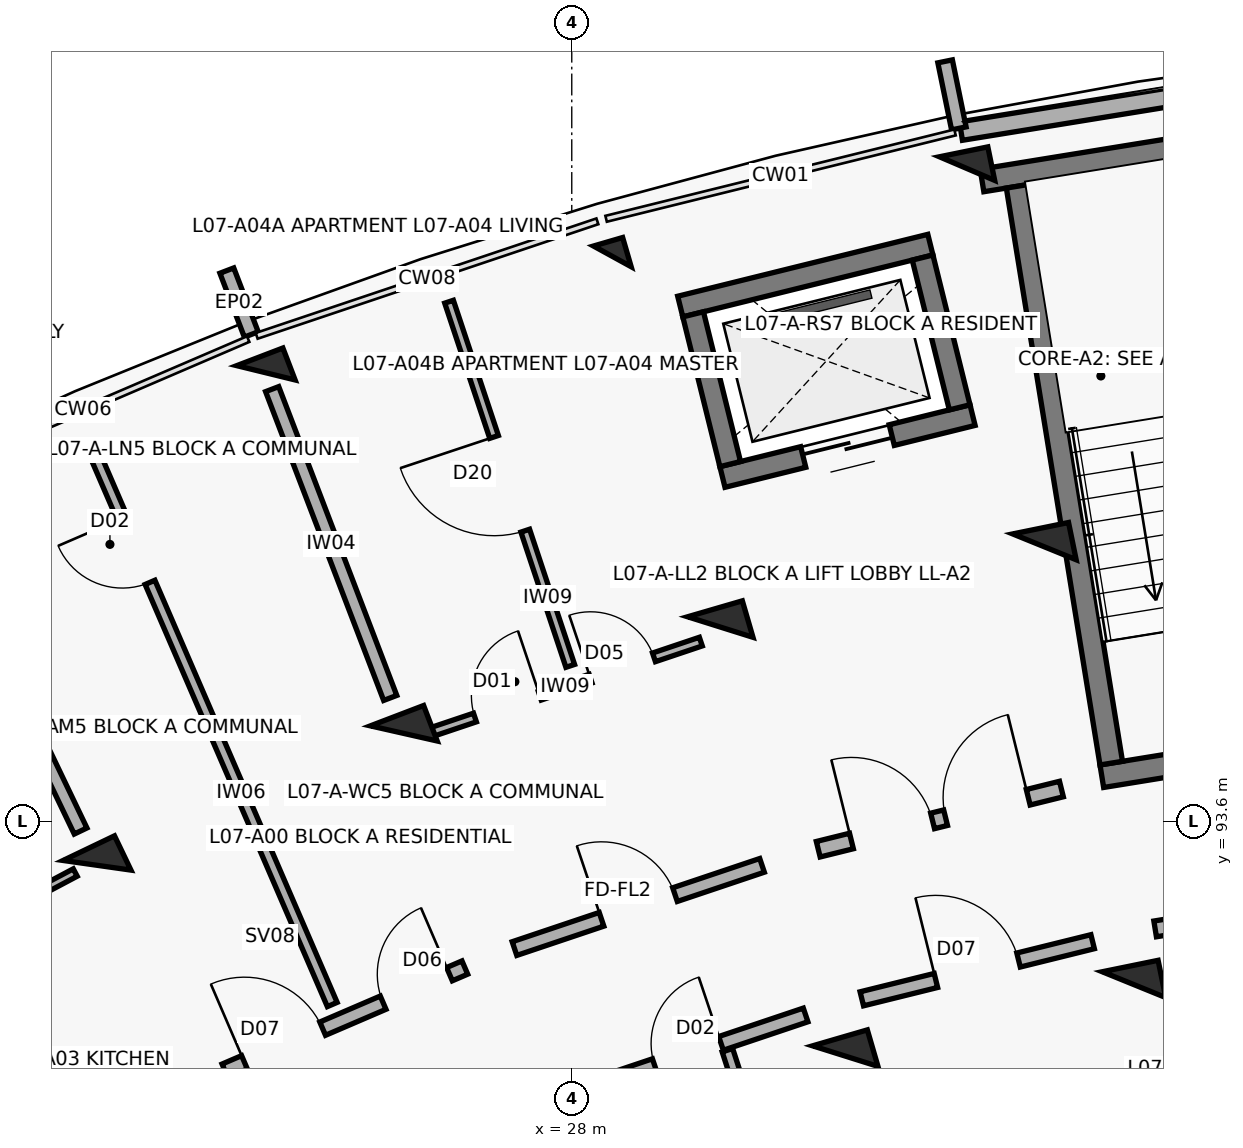
"""IFC4 building model, lengths in metres.
Left out: names, types, materials, properties, quantities, classifications, styles, units other than length and angle.
Written with IfcOpenShell. Run it as: python <this file> out.ifc"""

import sys

from ifc_helpers import new_model, si_unit, direction, frame, frame_2d, origin, origin_2d, place, context, subcontext, project, spatial, rectangle, extrude, element, fill, save


model = new_model("IFC4")
c1 = context("Model", 3, precision=1e-05, world=origin(), true_north=direction((0.0, 1.0)))
c2 = subcontext(c1, "Body", "Model", "MODEL_VIEW")
j1 = project(units=[si_unit("LENGTHUNIT", "METRE"), si_unit("PLANEANGLEUNIT", "RADIAN")], contexts=[c1])
p1 = place(None, origin())
s1 = spatial("IfcSite", under=j1, at=p1, CompositionType="ELEMENT")
p2 = place(p1, origin())
s2 = spatial("IfcBuilding", under=s1, at=p2, CompositionType="ELEMENT")
p3 = place(p2, frame((0.0, 0.0, 23.6)))
s3 = spatial("IfcBuildingStorey", under=s2, at=p3, CompositionType="ELEMENT", Elevation=23.6)
for number, where, z_axis, x_axis in (
    (1, (21.754, 93.019, 0.0), (0.0, 0.0, 1.0), (-0.432, 0.902, 0.0)),
    (2, (25.79, 94.753, 0.0), (0.0, 0.0, 1.0), (-0.357, 0.934, 0.0)),
):
    element("IfcColumn", number, at=place(p3, frame(where, z_axis=z_axis, x_axis=x_axis)), inside=s3, PredefinedType="COLUMN", context=c2, shape_type="SweptSolid", body=[
        extrude(rectangle(XDim=0.5, YDim=0.75, at=origin_2d()), origin(), (0.0, 0.0, 1.0), 3.1),
    ])
p4 = place(p3, frame((23.976, 99.499, 0.0), z_axis=(0.0, 0.0, 1.0), x_axis=(-0.357064076459, 0.934079892355, 0.0)))
e3 = element("IfcColumn", 3, at=p4, inside=s3, PredefinedType="COLUMN", context=c2, shape_type="SweptSolid", body=[
    extrude(rectangle(XDim=0.45, YDim=0.65, at=origin_2d()), origin(), (0.0, 0.0, 1.0), 3.1),
])
for number, where, z_axis, x_axis in (
    (4, (31.599, 90.508, 0.0), (0.0, 0.0, 1.0), (-0.28, 0.96, 0.0)),
    (5, (29.954, 96.153, 0.0), (0.0, 0.0, 1.0), (-0.28, 0.96, 0.0)),
):
    element("IfcColumn", number, at=place(p3, frame(where, z_axis=z_axis, x_axis=x_axis)), inside=s3, PredefinedType="COLUMN", context=c2, shape_type="SweptSolid", body=[
        extrude(rectangle(XDim=0.5, YDim=0.75, at=origin_2d()), origin(), (0.0, 0.0, 1.0), 3.1),
    ])
p5 = place(p3, frame((28.533, 101.031, 0.0), z_axis=(0.0, 0.0, 1.0), x_axis=(-0.27966144946, 0.96009867914, 0.0)))
e6 = element("IfcColumn", 6, at=p5, inside=s3, PredefinedType="COLUMN", context=c2, shape_type="SweptSolid", body=[
    extrude(rectangle(XDim=0.4, YDim=0.4, at=origin_2d()), origin(), (0.0, 0.0, 1.0), 3.1),
])
for number, where, z_axis, x_axis in (
    (7, (35.397, 91.448, 0.0), (0.0, 0.0, 1.0), (-0.2, 0.98, 0.0)),
    (8, (34.219, 97.209, 0.0), (0.0, 0.0, 1.0), (-0.2, 0.98, 0.0)),
):
    element("IfcColumn", number, at=place(p3, frame(where, z_axis=z_axis, x_axis=x_axis)), inside=s3, PredefinedType="COLUMN", context=c2, shape_type="SweptSolid", body=[
        extrude(rectangle(XDim=0.5, YDim=0.75, at=origin_2d()), origin(), (0.0, 0.0, 1.0), 3.1),
    ])
p6 = place(p3, frame((33.201, 102.186, 0.0), z_axis=(0.0, 0.0, 1.0), x_axis=(-0.200393999665, 0.979715389742, 0.0)))
e9 = element("IfcColumn", 9, at=p6, inside=s3, PredefinedType="COLUMN", context=c2, shape_type="SweptSolid", body=[
    extrude(rectangle(XDim=0.45, YDim=0.65, at=origin_2d()), origin(), (0.0, 0.0, 1.0), 3.1),
])
p7 = place(p3, frame((23.783, 100.003, 0.0), z_axis=(0.0, 0.0, 1.0), x_axis=(-0.356942580168, 0.934126326823, 0.0)))
e10 = element("IfcWall", 10, at=p7, inside=s3, PredefinedType="PARAPET", context=c2, shape_type="SweptSolid", body=[
    extrude(rectangle(XDim=0.9, YDim=0.195, at=frame_2d((0.45, 0.0))), origin(), (0.0, 0.0, 1.0), 2.25),
])
p8 = place(p3, frame((33.12, 102.679, 0.0), z_axis=(0.0, 0.0, 1.0), x_axis=(0.987080750493, 0.160223568819, 0.0)))
e11 = element("IfcWall", 11, at=p8, inside=s3, PredefinedType="SOLIDWALL", context=c2, shape_type="SweptSolid", body=[
    extrude(rectangle(XDim=4.809, YDim=0.245, at=frame_2d((2.404, 0.0))), origin(), (0.0, 0.0, 1.0), 2.25),
])
p9 = place(p3, frame((33.093, 102.715, 0.0), z_axis=(0.0, 0.0, 1.0), x_axis=(-0.200183211319, 0.979758481416, 0.0)))
e12 = element("IfcWall", 12, at=p9, inside=s3, PredefinedType="PARAPET", context=c2, shape_type="SweptSolid", body=[
    extrude(rectangle(XDim=0.9, YDim=0.195, at=frame_2d((0.45, 0.0))), origin(), (0.0, 0.0, 1.0), 2.25),
])
p10 = place(p3, frame((38.794, 94.811, 0.0), z_axis=(0.0, 0.0, 1.0), x_axis=(-0.987077443397, -0.160243941341, 0.0)))
e13 = element("IfcWall", 13, at=p10, inside=s3, PredefinedType="SHEAR", context=c2, shape_type="SweptSolid", body=[
    extrude(rectangle(XDim=3.87, YDim=0.3, at=frame_2d((1.935, 0.0))), origin(), (0.0, 0.0, 1.0), 3.1),
])
p11 = place(p10, frame((1.435, 0.0, 0.0)))
e14 = element("IfcOpeningElement", 14, at=p11, cuts=e13, PredefinedType="OPENING", context=c2, shape_type="SweptSolid", body=[
    extrude(rectangle(XDim=1.0, YDim=2.15, at=frame_2d((0.5, 1.075))), frame((0.0, 0.16, 0.0), z_axis=(0.0, -1.0, 0.0), x_axis=(1.0, 0.0, 0.0)), (0.0, 0.0, 1.0), 0.32),
])
p12 = place(p3, frame((37.81, 102.745, 0.0), z_axis=(0.0, 0.0, 1.0), x_axis=(-0.987084710126, -0.160199173019, 0.0)))
e15 = element("IfcWall", 15, at=p12, inside=s3, PredefinedType="SHEAR", context=c2, shape_type="SweptSolid", body=[
    extrude(rectangle(XDim=4.47, YDim=0.3, at=frame_2d((2.235, 0.0))), origin(), (0.0, 0.0, 1.0), 3.1),
])
p13 = place(p3, frame((35.098, 94.363, 0.0), z_axis=(0.0, 0.0, 1.0), x_axis=(-0.160227496777, 0.987080112897, 0.0)))
e16 = element("IfcWall", 16, at=p13, inside=s3, PredefinedType="SHEAR", context=c2, shape_type="SweptSolid", body=[
    extrude(rectangle(XDim=7.69, YDim=0.3, at=frame_2d((3.845, 0.0))), origin(), (0.0, 0.0, 1.0), 3.1),
])
p14 = place(p3, frame((33.273, 98.942, 0.0), z_axis=(0.0, 0.0, 1.0), x_axis=(-0.970707542441, -0.240264160972, 0.0)))
e17 = element("IfcWall", 17, at=p14, inside=s3, PredefinedType="SHEAR", context=c2, shape_type="SweptSolid", body=[
    extrude(rectangle(XDim=3.39, YDim=0.28, at=frame_2d((1.695, 0.0))), origin(), (0.0, 0.0, 1.0), 3.1),
])
p15 = place(p14, frame((1.095, 0.0, 0.0)))
e18 = element("IfcOpeningElement", 18, at=p15, cuts=e17, PredefinedType="OPENING", context=c2, shape_type="SweptSolid", body=[
    extrude(rectangle(XDim=1.2, YDim=2.15, at=frame_2d((0.6, 1.075))), frame((0.0, 0.15, 0.0), z_axis=(0.0, -1.0, 0.0), x_axis=(1.0, 0.0, 0.0)), (0.0, 0.0, 1.0), 0.3),
])
p16 = place(p3, frame((32.718, 101.185, 0.0), z_axis=(0.0, 0.0, 1.0), x_axis=(-0.970711699588, -0.240247364777, 0.0)))
e19 = element("IfcWall", 19, at=p16, inside=s3, PredefinedType="SHEAR", context=c2, shape_type="SweptSolid", body=[
    extrude(rectangle(XDim=3.39, YDim=0.28, at=frame_2d((1.695, 0.0))), origin(), (0.0, 0.0, 1.0), 3.1),
])
p17 = place(p3, frame((33.104, 99.044, 0.0), z_axis=(0.0, 0.0, 1.0), x_axis=(-0.240186044774, 0.970726873995, 0.0)))
e20 = element("IfcWall", 20, at=p17, inside=s3, PredefinedType="SHEAR", context=c2, shape_type="SweptSolid", body=[
    extrude(rectangle(XDim=2.03, YDim=0.28, at=frame_2d((1.015, 0.0))), origin(), (0.0, 0.0, 1.0), 3.1),
])
p18 = place(p3, frame((30.085, 98.297, 0.0), z_axis=(0.0, 0.0, 1.0), x_axis=(-0.2402993748, 0.970698825832, 0.0)))
e21 = element("IfcWall", 21, at=p18, inside=s3, PredefinedType="SHEAR", context=c2, shape_type="SweptSolid", body=[
    extrude(rectangle(XDim=2.03, YDim=0.28, at=frame_2d((1.015, 0.0))), origin(), (0.0, 0.0, 1.0), 3.1),
])
p19 = place(p3, frame((18.113, 91.144, 0.0), z_axis=(0.0, 0.0, 1.0), x_axis=(0.88341855112, 0.46858474531, 0.0)))
e22 = element("IfcWall", 22, at=p19, inside=s3, PredefinedType="PARTITIONING", context=c2, shape_type="SweptSolid", body=[
    extrude(rectangle(XDim=3.797, YDim=0.11, at=frame_2d((1.898, 0.0))), origin(), (0.0, 0.0, 1.0), 2.08),
])
p20 = place(p19, frame((0.65, 0.0, 0.0)))
e23 = element("IfcOpeningElement", 23, at=p20, cuts=e22, PredefinedType="OPENING", context=c2, shape_type="SweptSolid", body=[
    extrude(rectangle(XDim=0.9, YDim=2.1, at=frame_2d((0.45, 1.05))), frame((0.0, 0.065, 0.0), z_axis=(0.0, -1.0, 0.0), x_axis=(1.0, 0.0, 0.0)), (0.0, 0.0, 1.0), 0.13),
])
p21 = place(p19, frame((2.267, 0.0, 0.0)))
e24 = element("IfcOpeningElement", 24, at=p21, cuts=e22, PredefinedType="OPENING", context=c2, shape_type="SweptSolid", body=[
    extrude(rectangle(XDim=0.88, YDim=2.1, at=frame_2d((0.44, 1.05))), frame((0.0, 0.065, 0.0), z_axis=(0.0, -1.0, 0.0), x_axis=(1.0, 0.0, 0.0)), (0.0, 0.0, 1.0), 0.13),
])
p22 = place(p3, frame((23.437, 90.316, 0.0), z_axis=(0.0, 0.0, 1.0), x_axis=(0.918718172399, 0.394913813008, 0.0)))
e25 = element("IfcWall", 25, at=p22, inside=s3, PredefinedType="SOLIDWALL", context=c2, shape_type="SweptSolid", body=[
    extrude(rectangle(XDim=3.436, YDim=0.19, at=frame_2d((1.718, 0.0))), origin(), (0.0, 0.0, 1.0), 2.08),
])
p23 = place(p22, frame((0.28, 0.0, 0.0)))
e26 = element("IfcOpeningElement", 26, at=p23, cuts=e25, PredefinedType="OPENING", context=c2, shape_type="SweptSolid", body=[
    extrude(rectangle(XDim=1.12, YDim=2.15, at=frame_2d((0.56, 1.075))), frame((0.0, 0.105, 0.0), z_axis=(0.0, -1.0, 0.0), x_axis=(1.0, 0.0, 0.0)), (0.0, 0.0, 1.0), 0.21),
])
p24 = place(p22, frame((2.266, 0.0, 0.0)))
e27 = element("IfcOpeningElement", 27, at=p24, cuts=e25, PredefinedType="OPENING", context=c2, shape_type="SweptSolid", body=[
    extrude(rectangle(XDim=0.95, YDim=2.1, at=frame_2d((0.475, 1.05))), frame((0.0, 0.105, 0.0), z_axis=(0.0, -1.0, 0.0), x_axis=(1.0, 0.0, 0.0)), (0.0, 0.0, 1.0), 0.21),
])
p25 = place(p3, frame((24.849, 91.187, 0.0), z_axis=(0.0, 0.0, 1.0), x_axis=(-0.396278945437, 0.91813016365, 0.0)))
e28 = element("IfcWall", 28, at=p25, inside=s3, PredefinedType="PARTITIONING", context=c2, shape_type="SweptSolid", body=[
    extrude(rectangle(XDim=7.95, YDim=0.14, at=frame_2d((3.975, 0.0))), origin(), (0.0, 0.0, 1.0), 2.08),
])
p26 = place(p25, frame((6.05, 0.0, 0.0)))
e29 = element("IfcOpeningElement", 29, at=p26, cuts=e28, PredefinedType="OPENING", context=c2, shape_type="SweptSolid", body=[
    extrude(rectangle(XDim=0.92, YDim=2.1, at=frame_2d((0.46, 1.05))), frame((0.0, 0.08, 0.0), z_axis=(0.0, -1.0, 0.0), x_axis=(1.0, 0.0, 0.0)), (0.0, 0.0, 1.0), 0.16),
])
p27 = place(p3, frame((21.538, 93.469, 0.0), z_axis=(0.0, 0.0, 1.0), x_axis=(-0.432086898897, 0.901831975371, 0.0)))
e30 = element("IfcWall", 30, at=p27, inside=s3, PredefinedType="SOLIDWALL", context=c2, shape_type="SweptSolid", body=[
    extrude(rectangle(XDim=4.35, YDim=0.185, at=frame_2d((2.175, 0.0))), origin(), (0.0, 0.0, 1.0), 2.08),
])
p28 = place(p3, frame((27.247, 91.923, 0.0), z_axis=(0.0, 0.0, 1.0), x_axis=(0.947863007629, 0.318678080151, 0.0)))
e31 = element("IfcWall", 31, at=p28, inside=s3, PredefinedType="SOLIDWALL", context=c2, shape_type="SweptSolid", body=[
    extrude(rectangle(XDim=3.436, YDim=0.19, at=frame_2d((1.718, 0.0))), origin(), (0.0, 0.0, 1.0), 2.08),
])
p29 = place(p28, frame((1.208, 0.0, 0.0)))
e32 = element("IfcOpeningElement", 32, at=p29, cuts=e31, PredefinedType="OPENING", context=c2, shape_type="SweptSolid", body=[
    extrude(rectangle(XDim=1.02, YDim=2.15, at=frame_2d((0.51, 1.075))), frame((0.0, 0.105, 0.0), z_axis=(0.0, -1.0, 0.0), x_axis=(1.0, 0.0, 0.0)), (0.0, 0.0, 1.0), 0.21),
])
p30 = place(p3, frame((27.979, 90.008, 0.0), z_axis=(0.0, 0.0, 1.0), x_axis=(0.94787351033, 0.318646839643, 0.0)))
e33 = element("IfcWall", 33, at=p30, inside=s3, PredefinedType="SOLIDWALL", context=c2, shape_type="SweptSolid", body=[
    extrude(rectangle(XDim=3.269, YDim=0.19, at=frame_2d((1.634, 0.0))), origin(), (0.0, 0.0, 1.0), 2.08),
])
p31 = place(p30, frame((1.174, 0.0, 0.0)))
e34 = element("IfcOpeningElement", 34, at=p31, cuts=e33, PredefinedType="OPENING", context=c2, shape_type="SweptSolid", body=[
    extrude(rectangle(XDim=0.92, YDim=2.1, at=frame_2d((0.46, 1.05))), frame((0.0, 0.105, 0.0), z_axis=(0.0, -1.0, 0.0), x_axis=(1.0, 0.0, 0.0)), (0.0, 0.0, 1.0), 0.21),
])
p32 = place(p3, frame((31.066, 87.446, 0.0), z_axis=(0.0, 0.0, 1.0), x_axis=(-0.308582493915, 0.951197584337, 0.0)))
e35 = element("IfcWall", 35, at=p32, inside=s3, PredefinedType="PARTITIONING", context=c2, shape_type="SweptSolid", body=[
    extrude(rectangle(XDim=3.3, YDim=0.145, at=frame_2d((1.65, 0.0))), origin(), (0.0, 0.0, 1.0), 2.08),
])
p33 = place(p32, frame((1.21, 0.0, 0.0)))
e36 = element("IfcOpeningElement", 36, at=p33, cuts=e35, PredefinedType="OPENING", context=c2, shape_type="SweptSolid", body=[
    extrude(rectangle(XDim=0.88, YDim=2.1, at=frame_2d((0.44, 1.05))), frame((0.0, 0.083, 0.0), z_axis=(0.0, -1.0, 0.0), x_axis=(1.0, 0.0, 0.0)), (0.0, 0.0, 1.0), 0.165),
])
p34 = place(p3, frame((26.11, 94.756, 0.0), z_axis=(0.0, 0.0, 1.0), x_axis=(0.947873924847, 0.318645606584, 0.0)))
e37 = element("IfcWall", 37, at=p34, inside=s3, PredefinedType="PARTITIONING", context=c2, shape_type="SweptSolid", body=[
    extrude(rectangle(XDim=3.785, YDim=0.12, at=frame_2d((1.893, 0.0))), origin(), (0.0, 0.0, 1.0), 2.08),
])
p35 = place(p34, frame((0.65, 0.0, 0.0)))
e38 = element("IfcOpeningElement", 38, at=p35, cuts=e37, PredefinedType="OPENING", context=c2, shape_type="SweptSolid", body=[
    extrude(rectangle(XDim=0.9, YDim=2.1, at=frame_2d((0.45, 1.05))), frame((0.0, 0.07, 0.0), z_axis=(0.0, -1.0, 0.0), x_axis=(1.0, 0.0, 0.0)), (0.0, 0.0, 1.0), 0.14),
])
p36 = place(p34, frame((2.255, 0.0, 0.0)))
e39 = element("IfcOpeningElement", 39, at=p36, cuts=e37, PredefinedType="OPENING", context=c2, shape_type="SweptSolid", body=[
    extrude(rectangle(XDim=0.88, YDim=2.1, at=frame_2d((0.44, 1.05))), frame((0.0, 0.07, 0.0), z_axis=(0.0, -1.0, 0.0), x_axis=(1.0, 0.0, 0.0)), (0.0, 0.0, 1.0), 0.14),
])
p37 = place(p3, frame((27.98, 95.642, 0.0), z_axis=(0.0, 0.0, 1.0), x_axis=(-0.315749098291, 0.948842719806, 0.0)))
e40 = element("IfcWall", 40, at=p37, inside=s3, PredefinedType="PARTITIONING", context=c2, shape_type="SweptSolid", body=[
    extrude(rectangle(XDim=5.05, YDim=0.12, at=frame_2d((2.525, 0.0))), origin(), (0.0, 0.0, 1.0), 2.08),
])
p38 = place(p37, frame((1.875, 0.0, 0.0)))
e41 = element("IfcOpeningElement", 41, at=p38, cuts=e40, PredefinedType="OPENING", context=c2, shape_type="SweptSolid", body=[
    extrude(rectangle(XDim=1.3, YDim=2.1, at=frame_2d((0.65, 1.05))), frame((0.0, 0.07, 0.0), z_axis=(0.0, -1.0, 0.0), x_axis=(1.0, 0.0, 0.0)), (0.0, 0.0, 1.0), 0.14),
])
p39 = place(p3, frame((25.611, 95.22, 0.0), z_axis=(0.0, 0.0, 1.0), x_axis=(-0.357064016205, 0.934079915388, 0.0)))
e42 = element("IfcWall", 42, at=p39, inside=s3, PredefinedType="SOLIDWALL", context=c2, shape_type="SweptSolid", body=[
    extrude(rectangle(XDim=4.35, YDim=0.185, at=frame_2d((2.175, 0.0))), origin(), (0.0, 0.0, 1.0), 2.08),
])
p40 = place(p3, frame((31.243, 93.23, 0.0), z_axis=(0.0, 0.0, 1.0), x_axis=(0.970719238682, 0.240216901263, 0.0)))
e43 = element("IfcWall", 43, at=p40, inside=s3, PredefinedType="SOLIDWALL", context=c2, shape_type="SweptSolid", body=[
    extrude(rectangle(XDim=3.296, YDim=0.21, at=frame_2d((1.648, 0.0))), origin(), (0.0, 0.0, 1.0), 2.08),
])
p41 = place(p40, frame((0.45, 0.0, 0.0)))
e44 = element("IfcOpeningElement", 44, at=p41, cuts=e43, PredefinedType="OPENING", context=c2, shape_type="SweptSolid", body=[
    extrude(rectangle(XDim=1.1, YDim=2.15, at=frame_2d((0.55, 1.075))), frame((0.0, 0.115, 0.0), z_axis=(0.0, -1.0, 0.0), x_axis=(1.0, 0.0, 0.0)), (0.0, 0.0, 1.0), 0.23),
])
p42 = place(p40, frame((1.726, 0.0, 0.0)))
e45 = element("IfcOpeningElement", 45, at=p42, cuts=e43, PredefinedType="OPENING", context=c2, shape_type="SweptSolid", body=[
    extrude(rectangle(XDim=1.12, YDim=2.15, at=frame_2d((0.56, 1.075))), frame((0.0, 0.115, 0.0), z_axis=(0.0, -1.0, 0.0), x_axis=(1.0, 0.0, 0.0)), (0.0, 0.0, 1.0), 0.23),
])
p43 = place(p3, frame((31.816, 91.262, 0.0), z_axis=(0.0, 0.0, 1.0), x_axis=(0.970727194092, 0.240184751078, 0.0)))
e46 = element("IfcWall", 46, at=p43, inside=s3, PredefinedType="SOLIDWALL", context=c2, shape_type="SweptSolid", body=[
    extrude(rectangle(XDim=3.129, YDim=0.19, at=frame_2d((1.564, 0.0))), origin(), (0.0, 0.0, 1.0), 2.08),
])
p44 = place(p43, frame((1.004, 0.0, 0.0)))
e47 = element("IfcOpeningElement", 47, at=p44, cuts=e46, PredefinedType="OPENING", context=c2, shape_type="SweptSolid", body=[
    extrude(rectangle(XDim=1.12, YDim=2.15, at=frame_2d((0.56, 1.075))), frame((0.0, 0.105, 0.0), z_axis=(0.0, -1.0, 0.0), x_axis=(1.0, 0.0, 0.0)), (0.0, 0.0, 1.0), 0.21),
])
p45 = place(p3, frame((35.676, 92.181, 0.0), z_axis=(0.0, 0.0, 1.0), x_axis=(0.98707079686, 0.160284877599, 0.0)))
e48 = element("IfcWall", 48, at=p45, inside=s3, PredefinedType="SOLIDWALL", context=c2, shape_type="SweptSolid", body=[
    extrude(rectangle(XDim=3.129, YDim=0.21, at=frame_2d((1.564, 0.0))), origin(), (0.0, 0.0, 1.0), 2.08),
])
p46 = place(p45, frame((1.014, 0.0, 0.0)))
e49 = element("IfcOpeningElement", 49, at=p46, cuts=e48, PredefinedType="OPENING", context=c2, shape_type="SweptSolid", body=[
    extrude(rectangle(XDim=1.1, YDim=2.15, at=frame_2d((0.55, 1.075))), frame((0.0, 0.115, 0.0), z_axis=(0.0, -1.0, 0.0), x_axis=(1.0, 0.0, 0.0)), (0.0, 0.0, 1.0), 0.23),
])
p47 = place(p15, origin())
e50 = element("IfcDoor", 50, at=p47, inside=s3, OperationType="DOUBLE_DOOR_SLIDING", PredefinedType="DOOR", context=c2, shape_type="SweptSolid", body=[
    extrude(rectangle(XDim=1.2, YDim=2.15, at=frame_2d((0.6, 1.075))), frame((0.0, 0.025, 0.0), z_axis=(0.0, -1.0, 0.0), x_axis=(1.0, 0.0, 0.0)), (0.0, 0.0, 1.0), 0.05),
])
fill(e18, e50)
p48 = place(p23, origin())
e51 = element("IfcDoor", 51, at=p48, inside=s3, OperationType="SINGLE_SWING_LEFT", PredefinedType="DOOR", context=c2, shape_type="SweptSolid", body=[
    extrude(rectangle(XDim=1.12, YDim=2.15, at=frame_2d((0.56, 1.075))), frame((0.0, 0.025, 0.0), z_axis=(0.0, -1.0, 0.0), x_axis=(1.0, 0.0, 0.0)), (0.0, 0.0, 1.0), 0.05),
])
fill(e26, e51)
p49 = place(p24, origin())
e52 = element("IfcDoor", 52, at=p49, inside=s3, OperationType="SINGLE_SWING_RIGHT", PredefinedType="DOOR", context=c2, shape_type="SweptSolid", body=[
    extrude(rectangle(XDim=0.95, YDim=2.1, at=frame_2d((0.475, 1.05))), frame((0.0, 0.025, 0.0), z_axis=(0.0, -1.0, 0.0), x_axis=(1.0, 0.0, 0.0)), (0.0, 0.0, 1.0), 0.05),
])
fill(e27, e52)
p50 = place(p26, origin())
e53 = element("IfcDoor", 53, at=p50, inside=s3, OperationType="SINGLE_SWING_RIGHT", PredefinedType="DOOR", context=c2, shape_type="SweptSolid", body=[
    extrude(rectangle(XDim=0.92, YDim=2.1, at=frame_2d((0.46, 1.05))), frame((0.0, 0.025, 0.0), z_axis=(0.0, -1.0, 0.0), x_axis=(1.0, 0.0, 0.0)), (0.0, 0.0, 1.0), 0.05),
])
fill(e29, e53)
p51 = place(p29, origin())
e54 = element("IfcDoor", 54, at=p51, inside=s3, OperationType="SINGLE_SWING_LEFT", PredefinedType="DOOR", context=c2, shape_type="SweptSolid", body=[
    extrude(rectangle(XDim=1.02, YDim=2.15, at=frame_2d((0.51, 1.075))), frame((0.0, 0.025, 0.0), z_axis=(0.0, -1.0, 0.0), x_axis=(1.0, 0.0, 0.0)), (0.0, 0.0, 1.0), 0.05),
])
fill(e32, e54)
p52 = place(p31, origin())
e55 = element("IfcDoor", 55, at=p52, inside=s3, OperationType="SINGLE_SWING_RIGHT", PredefinedType="DOOR", context=c2, shape_type="SweptSolid", body=[
    extrude(rectangle(XDim=0.92, YDim=2.1, at=frame_2d((0.46, 1.05))), frame((0.0, 0.025, 0.0), z_axis=(0.0, -1.0, 0.0), x_axis=(1.0, 0.0, 0.0)), (0.0, 0.0, 1.0), 0.05),
])
fill(e34, e55)
p53 = place(p35, origin())
e56 = element("IfcDoor", 56, at=p53, inside=s3, OperationType="SINGLE_SWING_RIGHT", PredefinedType="DOOR", context=c2, shape_type="SweptSolid", body=[
    extrude(rectangle(XDim=0.9, YDim=2.1, at=frame_2d((0.45, 1.05))), frame((0.0, 0.025, 0.0), z_axis=(0.0, -1.0, 0.0), x_axis=(1.0, 0.0, 0.0)), (0.0, 0.0, 1.0), 0.05),
])
fill(e38, e56)
p54 = place(p36, origin())
e57 = element("IfcDoor", 57, at=p54, inside=s3, OperationType="SINGLE_SWING_LEFT", PredefinedType="DOOR", context=c2, shape_type="SweptSolid", body=[
    extrude(rectangle(XDim=0.88, YDim=2.1, at=frame_2d((0.44, 1.05))), frame((0.0, 0.025, 0.0), z_axis=(0.0, -1.0, 0.0), x_axis=(1.0, 0.0, 0.0)), (0.0, 0.0, 1.0), 0.05),
])
fill(e39, e57)
p55 = place(p38, origin())
e58 = element("IfcDoor", 58, at=p55, inside=s3, OperationType="SINGLE_SWING_RIGHT", PredefinedType="DOOR", context=c2, shape_type="SweptSolid", body=[
    extrude(rectangle(XDim=1.3, YDim=2.1, at=frame_2d((0.65, 1.05))), frame((0.0, 0.025, 0.0), z_axis=(0.0, -1.0, 0.0), x_axis=(1.0, 0.0, 0.0)), (0.0, 0.0, 1.0), 0.05),
])
fill(e41, e58)
p56 = place(p41, origin())
e59 = element("IfcDoor", 59, at=p56, inside=s3, OperationType="SINGLE_SWING_LEFT", PredefinedType="DOOR", context=c2, shape_type="SweptSolid", body=[
    extrude(rectangle(XDim=1.1, YDim=2.15, at=frame_2d((0.55, 1.075))), frame((0.0, 0.025, 0.0), z_axis=(0.0, -1.0, 0.0), x_axis=(1.0, 0.0, 0.0)), (0.0, 0.0, 1.0), 0.05),
])
fill(e44, e59)
p57 = place(p42, origin())
e60 = element("IfcDoor", 60, at=p57, inside=s3, OperationType="SINGLE_SWING_RIGHT", PredefinedType="DOOR", context=c2, shape_type="SweptSolid", body=[
    extrude(rectangle(XDim=1.12, YDim=2.15, at=frame_2d((0.56, 1.075))), frame((0.0, 0.025, 0.0), z_axis=(0.0, -1.0, 0.0), x_axis=(1.0, 0.0, 0.0)), (0.0, 0.0, 1.0), 0.05),
])
fill(e45, e60)
p58 = place(p44, origin())
e61 = element("IfcDoor", 61, at=p58, inside=s3, OperationType="SINGLE_SWING_LEFT", PredefinedType="DOOR", context=c2, shape_type="SweptSolid", body=[
    extrude(rectangle(XDim=1.12, YDim=2.15, at=frame_2d((0.56, 1.075))), frame((0.0, 0.025, 0.0), z_axis=(0.0, -1.0, 0.0), x_axis=(1.0, 0.0, 0.0)), (0.0, 0.0, 1.0), 0.05),
])
fill(e47, e61)
save(model, sys.argv[1])
